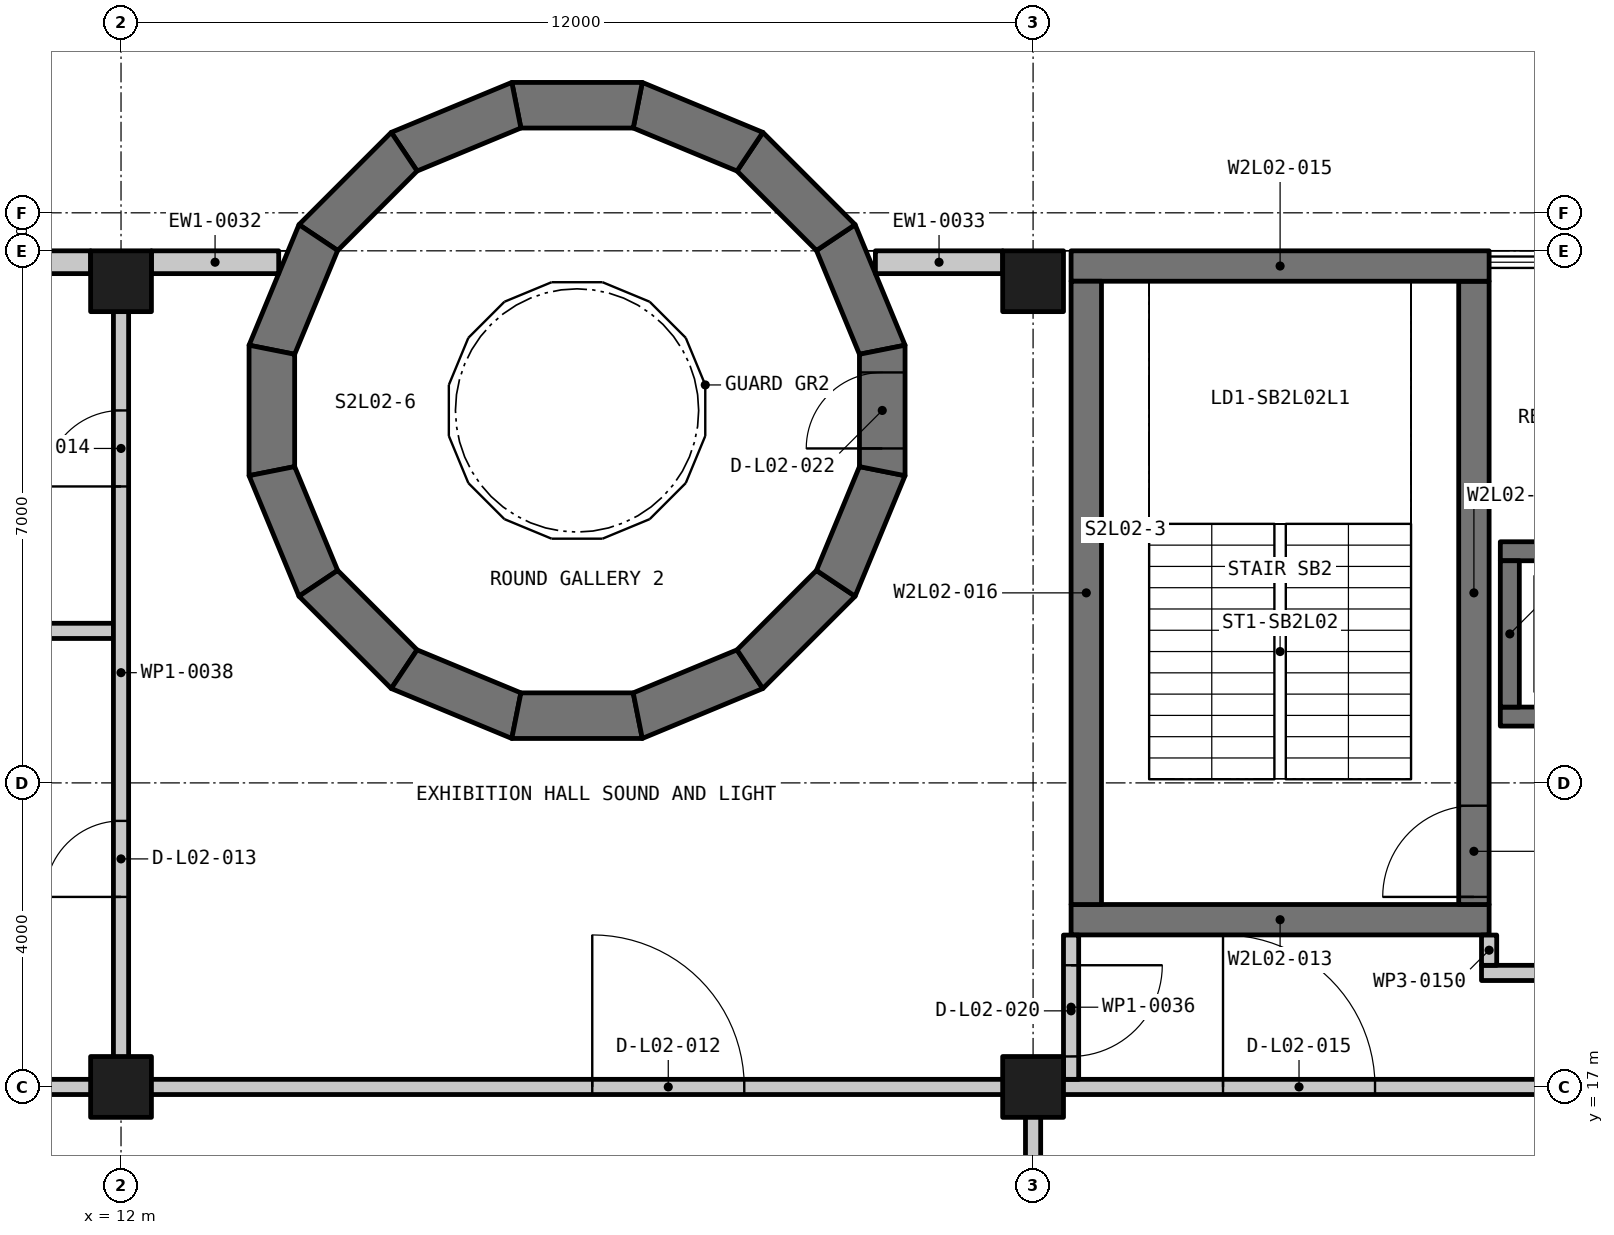
"""IFC4 building model, lengths in metres.
Left out: names, types, materials, properties, quantities, classifications, styles, units other than length and angle.
Written with IfcOpenShell. Run it as: python <this file> out.ifc"""

import sys

from ifc_helpers import new_model, si_unit, direction, frame, frame_2d, origin, origin_2d, place, context, subcontext, project, spatial, polyline, rectangle, outline, extrude, element, fill, save


model = new_model("IFC4")
c1 = context("Model", 3, precision=1e-05, world=origin(), true_north=direction((0.0, 1.0)))
c2 = subcontext(c1, "Body", "Model", "MODEL_VIEW")
j1 = project(units=[si_unit("LENGTHUNIT", "METRE"), si_unit("PLANEANGLEUNIT", "RADIAN")], contexts=[c1])
p1 = place(None, origin())
s1 = spatial("IfcSite", under=j1, at=p1, CompositionType="ELEMENT")
p2 = place(p1, origin())
s2 = spatial("IfcBuilding", under=s1, at=p2, CompositionType="ELEMENT")
p3 = place(p2, frame((0.0, 0.0, 11.25)))
s3 = spatial("IfcBuildingStorey", under=s2, at=p3, CompositionType="ELEMENT", Elevation=11.25)
p4 = place(p3, frame((12.0, 17.0, -0.3), z_axis=(0.0, 0.0, 1.0), x_axis=(1.0, 0.0, 0.0)))
e1 = element("IfcColumn", 1, at=p4, inside=s3, PredefinedType="COLUMN", context=c2, shape_type="SweptSolid", body=[
    extrude(rectangle(XDim=0.8, YDim=0.8, at=origin_2d()), origin(), (0.0, 0.0, 1.0), 4.05),
])
p5 = place(p3, frame((12.0, 27.6, -0.3), z_axis=(0.0, 0.0, 1.0), x_axis=(1.0, 0.0, 0.0)))
e2 = element("IfcColumn", 2, at=p5, inside=s3, PredefinedType="COLUMN", context=c2, shape_type="SweptSolid", body=[
    extrude(rectangle(XDim=0.8, YDim=0.8, at=origin_2d()), origin(), (0.0, 0.0, 1.0), 4.16),
])
p6 = place(p3, frame((24.0, 17.0, -0.3), z_axis=(0.0, 0.0, 1.0), x_axis=(1.0, 0.0, 0.0)))
e3 = element("IfcColumn", 3, at=p6, inside=s3, PredefinedType="COLUMN", context=c2, shape_type="SweptSolid", body=[
    extrude(rectangle(XDim=0.8, YDim=0.8, at=origin_2d()), origin(), (0.0, 0.0, 1.0), 4.05),
])
p7 = place(p3, frame((24.0, 27.6, -0.3), z_axis=(0.0, 0.0, 1.0), x_axis=(1.0, 0.0, 0.0)))
e4 = element("IfcColumn", 4, at=p7, inside=s3, PredefinedType="COLUMN", context=c2, shape_type="SweptSolid", body=[
    extrude(rectangle(XDim=0.8, YDim=0.8, at=origin_2d()), origin(), (0.0, 0.0, 1.0), 4.16),
])
p8 = place(p3, frame((22.038, 26.644, -0.3), z_axis=(0.0, 0.0, 1.0), x_axis=(-0.382665770144, 0.923886848245, 0.0)))
e5 = element("IfcWall", 5, at=p8, inside=s3, PredefinedType="SHEAR", context=c2, shape_type="SweptSolid", body=[
    extrude(outline(polyline([(0.0, -0.3), (1.717, -0.3), (1.597, 0.3), (0.119, 0.3), (0.0, -0.3)])), origin(), (0.0, 0.0, 1.0), 4.5),
])
p9 = place(p3, frame((21.446, 28.132, -0.3), z_axis=(0.0, 0.0, 1.0), x_axis=(-0.707035675874, 0.707177879349, 0.0)))
e6 = element("IfcWall", 6, at=p9, inside=s3, PredefinedType="SHEAR", context=c2, shape_type="SweptSolid", body=[
    extrude(outline(polyline([(0.0, -0.3), (1.717, -0.3), (1.597, 0.3), (0.119, 0.3), (0.0, -0.3)])), origin(), (0.0, 0.0, 1.0), 4.5),
])
p10 = place(p3, frame((20.33, 29.281, -0.3), z_axis=(0.0, 0.0, 1.0), x_axis=(-0.923866021052, 0.382716050285, 0.0)))
e7 = element("IfcWall", 7, at=p10, inside=s3, PredefinedType="SHEAR", context=c2, shape_type="SweptSolid", body=[
    extrude(outline(polyline([(0.0, -0.3), (1.717, -0.3), (1.597, 0.3), (0.119, 0.3), (0.0, -0.3)])), origin(), (0.0, 0.0, 1.0), 4.5),
])
p11 = place(p3, frame((18.858, 29.916, -0.3), z_axis=(0.0, 0.0, 1.0), x_axis=(-1.0, 0.0, 0.0)))
e8 = element("IfcWall", 8, at=p11, inside=s3, PredefinedType="SHEAR", context=c2, shape_type="SweptSolid", body=[
    extrude(outline(polyline([(0.0, -0.3), (1.717, -0.3), (1.597, 0.3), (0.119, 0.3), (0.0, -0.3)])), origin(), (0.0, 0.0, 1.0), 4.5),
])
p12 = place(p3, frame((17.256, 29.938, -0.3), z_axis=(0.0, 0.0, 1.0), x_axis=(-0.923866021052, -0.382716050285, 0.0)))
e9 = element("IfcWall", 9, at=p12, inside=s3, PredefinedType="SHEAR", context=c2, shape_type="SweptSolid", body=[
    extrude(outline(polyline([(-0.0, -0.3), (1.717, -0.3), (1.597, 0.3), (0.119, 0.3), (-0.0, -0.3)])), origin(), (0.0, 0.0, 1.0), 4.5),
])
p13 = place(p3, frame((15.768, 29.346, -0.3), z_axis=(0.0, 0.0, 1.0), x_axis=(-0.707035675874, -0.707177879349, 0.0)))
e10 = element("IfcWall", 10, at=p13, inside=s3, PredefinedType="SHEAR", context=c2, shape_type="SweptSolid", body=[
    extrude(outline(polyline([(0.0, -0.3), (1.717, -0.3), (1.598, 0.3), (0.119, 0.3), (0.0, -0.3)])), origin(), (0.0, 0.0, 1.0), 4.5),
])
p14 = place(p3, frame((14.619, 28.23, -0.3), z_axis=(0.0, 0.0, 1.0), x_axis=(-0.382665770144, -0.923886848245, 0.0)))
e11 = element("IfcWall", 11, at=p14, inside=s3, PredefinedType="SHEAR", context=c2, shape_type="SweptSolid", body=[
    extrude(outline(polyline([(0.0, -0.3), (1.717, -0.3), (1.598, 0.3), (0.119, 0.3), (0.0, -0.3)])), origin(), (0.0, 0.0, 1.0), 4.5),
])
p15 = place(p3, frame((13.985, 26.758, -0.3), z_axis=(0.0, 0.0, 1.0), x_axis=(0.0, -1.0, 0.0)))
e12 = element("IfcWall", 12, at=p15, inside=s3, PredefinedType="SHEAR", context=c2, shape_type="SweptSolid", body=[
    extrude(outline(polyline([(0.0, -0.3), (1.717, -0.3), (1.597, 0.3), (0.119, 0.3), (0.0, -0.3)])), origin(), (0.0, 0.0, 1.0), 4.5),
])
p16 = place(p3, frame((13.962, 25.156, -0.3), z_axis=(0.0, 0.0, 1.0), x_axis=(0.382665770144, -0.923886848245, 0.0)))
e13 = element("IfcWall", 13, at=p16, inside=s3, PredefinedType="SHEAR", context=c2, shape_type="SweptSolid", body=[
    extrude(outline(polyline([(0.0, -0.3), (1.717, -0.3), (1.597, 0.3), (0.119, 0.3), (0.0, -0.3)])), origin(), (0.0, 0.0, 1.0), 4.5),
])
p17 = place(p3, frame((14.554, 23.668, -0.3), z_axis=(0.0, 0.0, 1.0), x_axis=(0.707035675874, -0.707177879349, 0.0)))
e14 = element("IfcWall", 14, at=p17, inside=s3, PredefinedType="SHEAR", context=c2, shape_type="SweptSolid", body=[
    extrude(outline(polyline([(0.0, -0.3), (1.717, -0.3), (1.597, 0.3), (0.119, 0.3), (0.0, -0.3)])), origin(), (0.0, 0.0, 1.0), 4.5),
])
p18 = place(p3, frame((15.67, 22.519, -0.3), z_axis=(0.0, 0.0, 1.0), x_axis=(0.923866021052, -0.382716050285, 0.0)))
e15 = element("IfcWall", 15, at=p18, inside=s3, PredefinedType="SHEAR", context=c2, shape_type="SweptSolid", body=[
    extrude(outline(polyline([(0.0, -0.3), (1.717, -0.3), (1.597, 0.3), (0.119, 0.3), (0.0, -0.3)])), origin(), (0.0, 0.0, 1.0), 4.5),
])
p19 = place(p3, frame((17.142, 21.885, -0.3), z_axis=(0.0, 0.0, 1.0), x_axis=(1.0, 0.0, 0.0)))
e16 = element("IfcWall", 16, at=p19, inside=s3, PredefinedType="SHEAR", context=c2, shape_type="SweptSolid", body=[
    extrude(outline(polyline([(0.0, -0.3), (1.717, -0.3), (1.597, 0.3), (0.119, 0.3), (0.0, -0.3)])), origin(), (0.0, 0.0, 1.0), 4.5),
])
p20 = place(p3, frame((18.744, 21.862, -0.3), z_axis=(0.0, 0.0, 1.0), x_axis=(0.923866021052, 0.382716050285, 0.0)))
e17 = element("IfcWall", 17, at=p20, inside=s3, PredefinedType="SHEAR", context=c2, shape_type="SweptSolid", body=[
    extrude(outline(polyline([(-0.0, -0.3), (1.717, -0.3), (1.597, 0.3), (0.119, 0.3), (-0.0, -0.3)])), origin(), (0.0, 0.0, 1.0), 4.5),
])
p21 = place(p3, frame((20.232, 22.454, -0.3), z_axis=(0.0, 0.0, 1.0), x_axis=(0.707035675874, 0.707177879349, 0.0)))
e18 = element("IfcWall", 18, at=p21, inside=s3, PredefinedType="SHEAR", context=c2, shape_type="SweptSolid", body=[
    extrude(outline(polyline([(0.0, -0.3), (1.717, -0.3), (1.598, 0.3), (0.119, 0.3), (0.0, -0.3)])), origin(), (0.0, 0.0, 1.0), 4.5),
])
p22 = place(p3, frame((21.381, 23.57, -0.3), z_axis=(0.0, 0.0, 1.0), x_axis=(0.382665770144, 0.923886848245, 0.0)))
e19 = element("IfcWall", 19, at=p22, inside=s3, PredefinedType="SHEAR", context=c2, shape_type="SweptSolid", body=[
    extrude(outline(polyline([(0.0, -0.3), (1.717, -0.3), (1.597, 0.3), (0.119, 0.3), (0.0, -0.3)])), origin(), (0.0, 0.0, 1.0), 4.5),
])
p23 = place(p3, frame((22.015, 25.042, -0.3), z_axis=(0.0, 0.0, 1.0), x_axis=(0.0, 1.0, 0.0)))
e20 = element("IfcWall", 20, at=p23, inside=s3, PredefinedType="SHEAR", context=c2, shape_type="SweptSolid", body=[
    extrude(outline(polyline([(0.0, -0.3), (1.717, -0.3), (1.597, 0.3), (0.119, 0.3), (0.0, -0.3)])), origin(), (0.0, 0.0, 1.0), 4.5),
])
p24 = place(p23, frame((0.358, 0.0, 0.3)))
e21 = element("IfcOpeningElement", 21, at=p24, cuts=e20, PredefinedType="OPENING", context=c2, shape_type="SweptSolid", body=[
    extrude(rectangle(XDim=1.0, YDim=2.2, at=frame_2d((0.5, 1.1))), frame((0.0, 0.31, 0.0), z_axis=(0.0, -1.0, 0.0), x_axis=(1.0, 0.0, 0.0)), (0.0, 0.0, 1.0), 0.62),
])
p25 = place(p3, frame((30.147, 21.873, -0.3), z_axis=(0.0, 0.0, 1.0), x_axis=(1.0, 0.0, 0.0)))
e22 = element("IfcWall", 22, at=p25, inside=s3, PredefinedType="SHEAR", context=c2, shape_type="SweptSolid", body=[
    extrude(rectangle(XDim=2.425, YDim=0.25, at=frame_2d((1.212, 0.0))), origin(), (0.0, 0.0, 1.0), 4.5),
])
p26 = place(p25, frame((0.663, 0.0, 0.3)))
e23 = element("IfcOpeningElement", 23, at=p26, cuts=e22, PredefinedType="OPENING", context=c2, shape_type="SweptSolid", body=[
    extrude(rectangle(XDim=1.1, YDim=2.1, at=frame_2d((0.55, 1.05))), frame((0.0, 0.135, 0.0), z_axis=(0.0, -1.0, 0.0), x_axis=(1.0, 0.0, 0.0)), (0.0, 0.0, 1.0), 0.27),
])
p27 = place(p3, frame((30.147, 24.048, -0.3), z_axis=(0.0, 0.0, 1.0), x_axis=(1.0, 0.0, 0.0)))
e24 = element("IfcWall", 24, at=p27, inside=s3, PredefinedType="SHEAR", context=c2, shape_type="SweptSolid", body=[
    extrude(rectangle(XDim=2.425, YDim=0.25, at=frame_2d((1.212, 0.0))), origin(), (0.0, 0.0, 1.0), 4.5),
])
p28 = place(p3, frame((30.272, 21.998, -0.3), z_axis=(0.0, 0.0, 1.0), x_axis=(0.0, 1.0, 0.0)))
e25 = element("IfcWall", 25, at=p28, inside=s3, PredefinedType="SHEAR", context=c2, shape_type="SweptSolid", body=[
    extrude(rectangle(XDim=1.925, YDim=0.25, at=frame_2d((0.962, 0.0))), origin(), (0.0, 0.0, 1.0), 4.5),
])
p29 = place(p3, frame((24.5, 19.2, -0.3), z_axis=(0.0, 0.0, 1.0), x_axis=(1.0, 0.0, 0.0)))
e26 = element("IfcWall", 26, at=p29, inside=s3, PredefinedType="SHEAR", context=c2, shape_type="SweptSolid", body=[
    extrude(rectangle(XDim=5.5, YDim=0.4, at=frame_2d((2.75, 0.0))), origin(), (0.0, 0.0, 1.0), 4.5),
])
p30 = place(p3, frame((29.8, 19.4, -0.3), z_axis=(0.0, 0.0, 1.0), x_axis=(0.0, 1.0, 0.0)))
e27 = element("IfcWall", 27, at=p30, inside=s3, PredefinedType="SHEAR", context=c2, shape_type="SweptSolid", body=[
    extrude(rectangle(XDim=8.2, YDim=0.4, at=frame_2d((4.1, 0.0))), origin(), (0.0, 0.0, 1.0), 4.5),
])
p31 = place(p30, frame((0.1, 0.0, 0.3)))
e28 = element("IfcOpeningElement", 28, at=p31, cuts=e27, PredefinedType="OPENING", context=c2, shape_type="SweptSolid", body=[
    extrude(rectangle(XDim=1.2, YDim=2.2, at=frame_2d((0.6, 1.1))), frame((0.0, 0.21, 0.0), z_axis=(0.0, -1.0, 0.0), x_axis=(1.0, 0.0, 0.0)), (0.0, 0.0, 1.0), 0.42),
])
p32 = place(p3, frame((24.5, 27.8, -0.3), z_axis=(0.0, 0.0, 1.0), x_axis=(1.0, 0.0, 0.0)))
e29 = element("IfcWall", 29, at=p32, inside=s3, PredefinedType="SHEAR", context=c2, shape_type="SweptSolid", body=[
    extrude(rectangle(XDim=5.5, YDim=0.4, at=frame_2d((2.75, 0.0))), origin(), (0.0, 0.0, 1.0), 4.5),
])
p33 = place(p3, frame((24.7, 19.4, -0.3), z_axis=(0.0, 0.0, 1.0), x_axis=(0.0, 1.0, 0.0)))
e30 = element("IfcWall", 30, at=p33, inside=s3, PredefinedType="SHEAR", context=c2, shape_type="SweptSolid", body=[
    extrude(rectangle(XDim=8.2, YDim=0.4, at=frame_2d((4.1, 0.0))), origin(), (0.0, 0.0, 1.0), 4.5),
])
p34 = place(p3, frame((6.0, 27.85, 0.0), z_axis=(0.0, 0.0, 1.0), x_axis=(1.0, 0.0, 0.0)))
e31 = element("IfcWall", 31, at=p34, inside=s3, PredefinedType="SOLIDWALL", context=c2, shape_type="SweptSolid", body=[
    extrude(rectangle(XDim=5.6, YDim=0.3, at=frame_2d((2.8, 0.0))), origin(), (0.0, 0.0, 1.0), 3.86),
])
for number, where, z_axis, x_axis in (
    (32, (12.4, 27.85, 0.0), (0.0, 0.0, 1.0), (1.0, 0.0, 0.0)),
    (33, (21.926, 27.85, 0.0), (0.0, 0.0, 1.0), (1.0, 0.0, 0.0)),
):
    element("IfcWall", number, at=place(p3, frame(where, z_axis=z_axis, x_axis=x_axis)), inside=s3, PredefinedType="SOLIDWALL", context=c2, shape_type="SweptSolid", body=[
        extrude(rectangle(XDim=1.675, YDim=0.3, at=frame_2d((0.837, 0.0))), origin(), (0.0, 0.0, 1.0), 3.86),
    ])
p35 = place(p3, frame((5.9, 17.0, 0.0), z_axis=(0.0, 0.0, 1.0), x_axis=(1.0, 0.0, 0.0)))
e34 = element("IfcWall", 34, at=p35, inside=s3, PredefinedType="PARTITIONING", context=c2, shape_type="SweptSolid", body=[
    extrude(rectangle(XDim=54.2, YDim=0.2, at=frame_2d((27.1, 0.0))), origin(), (0.0, 0.0, 1.0), 3.75),
])
p36 = place(p35, frame((12.3, 0.0, 0.0)))
e35 = element("IfcOpeningElement", 35, at=p36, cuts=e34, PredefinedType="OPENING", context=c2, shape_type="SweptSolid", body=[
    extrude(rectangle(XDim=2.0, YDim=2.1, at=frame_2d((1.0, 1.05))), frame((0.0, 0.11, 0.0), z_axis=(0.0, -1.0, 0.0), x_axis=(1.0, 0.0, 0.0)), (0.0, 0.0, 1.0), 0.22),
])
p37 = place(p35, frame((20.599, 0.0, 0.0)))
e36 = element("IfcOpeningElement", 36, at=p37, cuts=e34, PredefinedType="OPENING", context=c2, shape_type="SweptSolid", body=[
    extrude(rectangle(XDim=2.0, YDim=2.1, at=frame_2d((1.0, 1.05))), frame((0.0, 0.11, 0.0), z_axis=(0.0, -1.0, 0.0), x_axis=(1.0, 0.0, 0.0)), (0.0, 0.0, 1.0), 0.22),
])
p38 = place(p35, frame((47.35, 0.0, 0.0)))
e37 = element("IfcOpeningElement", 37, at=p38, cuts=e34, PredefinedType="OPENING", context=c2, shape_type="SweptSolid", body=[
    extrude(rectangle(XDim=1.5, YDim=2.1, at=frame_2d((0.75, 1.05))), frame((0.0, 0.11, 0.0), z_axis=(0.0, -1.0, 0.0), x_axis=(1.0, 0.0, 0.0)), (0.0, 0.0, 1.0), 0.22),
])
p39 = place(p3, frame((29.9, 18.5, 0.0), z_axis=(0.0, 0.0, 1.0), x_axis=(1.0, 0.0, 0.0)))
e38 = element("IfcWall", 38, at=p39, inside=s3, PredefinedType="PARTITIONING", context=c2, shape_type="SweptSolid", body=[
    extrude(rectangle(XDim=5.7, YDim=0.2, at=frame_2d((2.85, 0.0))), origin(), (0.0, 0.0, 1.0), 4.35),
])
p40 = place(p3, frame((6.002, 23.0, 0.0), z_axis=(0.0, 0.0, 1.0), x_axis=(1.0, 0.0, 0.0)))
e39 = element("IfcWall", 39, at=p40, inside=s3, PredefinedType="PARTITIONING", context=c2, shape_type="SweptSolid", body=[
    extrude(rectangle(XDim=5.898, YDim=0.2, at=frame_2d((2.949, 0.0))), origin(), (0.0, 0.0, 1.0), 4.35),
])
p41 = place(p3, frame((30.0, 18.6, 0.0), z_axis=(0.0, 0.0, 1.0), x_axis=(0.0, 1.0, 0.0)))
e40 = element("IfcWall", 40, at=p41, inside=s3, PredefinedType="PARTITIONING", context=c2, shape_type="SweptSolid", body=[
    extrude(rectangle(XDim=0.398, YDim=0.2, at=frame_2d((0.199, 0.0))), origin(), (0.0, 0.0, 1.0), 4.35),
])
p42 = place(p3, frame((24.5, 18.998, 0.0), z_axis=(0.0, 0.0, 1.0), x_axis=(0.0, -1.0, 0.0)))
e41 = element("IfcWall", 41, at=p42, inside=s3, PredefinedType="PARTITIONING", context=c2, shape_type="SweptSolid", body=[
    extrude(rectangle(XDim=1.898, YDim=0.2, at=frame_2d((0.949, 0.0))), origin(), (0.0, 0.0, 1.0), 4.35),
])
p43 = place(p42, frame((0.397, 0.0, 0.0)))
e42 = element("IfcOpeningElement", 42, at=p43, cuts=e41, PredefinedType="OPENING", context=c2, shape_type="SweptSolid", body=[
    extrude(rectangle(XDim=1.2, YDim=2.1, at=frame_2d((0.6, 1.05))), frame((0.0, 0.11, 0.0), z_axis=(0.0, -1.0, 0.0), x_axis=(1.0, 0.0, 0.0)), (0.0, 0.0, 1.0), 0.22),
])
p44 = place(p3, frame((24.0, 6.2, 0.0), z_axis=(0.0, 0.0, 1.0), x_axis=(0.0, 1.0, 0.0)))
e43 = element("IfcWall", 43, at=p44, inside=s3, PredefinedType="PARTITIONING", context=c2, shape_type="SweptSolid", body=[
    extrude(rectangle(XDim=10.7, YDim=0.2, at=frame_2d((5.35, 0.0))), origin(), (0.0, 0.0, 1.0), 3.86),
])
p45 = place(p3, frame((12.0, 17.1, 0.0), z_axis=(0.0, 0.0, 1.0), x_axis=(0.0, 1.0, 0.0)))
e44 = element("IfcWall", 44, at=p45, inside=s3, PredefinedType="PARTITIONING", context=c2, shape_type="SweptSolid", body=[
    extrude(rectangle(XDim=10.7, YDim=0.2, at=frame_2d((5.35, 0.0))), origin(), (0.0, 0.0, 1.0), 3.86),
])
p46 = place(p45, frame((2.4, 0.0, 0.0)))
e45 = element("IfcOpeningElement", 45, at=p46, cuts=e44, PredefinedType="OPENING", context=c2, shape_type="SweptSolid", body=[
    extrude(rectangle(XDim=1.0, YDim=2.1, at=frame_2d((0.5, 1.05))), frame((0.0, 0.11, 0.0), z_axis=(0.0, -1.0, 0.0), x_axis=(1.0, 0.0, 0.0)), (0.0, 0.0, 1.0), 0.22),
])
p47 = place(p45, frame((7.8, 0.0, 0.0)))
e46 = element("IfcOpeningElement", 46, at=p47, cuts=e44, PredefinedType="OPENING", context=c2, shape_type="SweptSolid", body=[
    extrude(rectangle(XDim=1.0, YDim=2.1, at=frame_2d((0.5, 1.05))), frame((0.0, 0.11, 0.0), z_axis=(0.0, -1.0, 0.0), x_axis=(1.0, 0.0, 0.0)), (0.0, 0.0, 1.0), 0.22),
])
p48 = place(p31, origin())
e47 = element("IfcDoor", 47, at=p48, inside=s3, OperationType="SINGLE_SWING_RIGHT", PredefinedType="DOOR", context=c2, shape_type="SweptSolid", body=[
    extrude(rectangle(XDim=1.2, YDim=2.2, at=frame_2d((0.6, 1.1))), frame((0.0, 0.025, 0.0), z_axis=(0.0, -1.0, 0.0), x_axis=(1.0, 0.0, 0.0)), (0.0, 0.0, 1.0), 0.05),
])
fill(e28, e47)
p49 = place(p36, origin())
e48 = element("IfcDoor", 48, at=p49, inside=s3, OperationType="DOUBLE_DOOR_SINGLE_SWING", PredefinedType="DOOR", context=c2, shape_type="SweptSolid", body=[
    extrude(rectangle(XDim=2.0, YDim=2.1, at=frame_2d((1.0, 1.05))), frame((0.0, 0.025, 0.0), z_axis=(0.0, -1.0, 0.0), x_axis=(1.0, 0.0, 0.0)), (0.0, 0.0, 1.0), 0.05),
])
fill(e35, e48)
p50 = place(p46, origin())
e49 = element("IfcDoor", 49, at=p50, inside=s3, OperationType="SINGLE_SWING_RIGHT", PredefinedType="DOOR", context=c2, shape_type="SweptSolid", body=[
    extrude(rectangle(XDim=1.0, YDim=2.1, at=frame_2d((0.5, 1.05))), frame((0.0, 0.025, 0.0), z_axis=(0.0, -1.0, 0.0), x_axis=(1.0, 0.0, 0.0)), (0.0, 0.0, 1.0), 0.05),
])
fill(e45, e49)
p51 = place(p47, origin())
e50 = element("IfcDoor", 50, at=p51, inside=s3, OperationType="SINGLE_SWING_LEFT", PredefinedType="DOOR", context=c2, shape_type="SweptSolid", body=[
    extrude(rectangle(XDim=1.0, YDim=2.1, at=frame_2d((0.5, 1.05))), frame((0.0, 0.025, 0.0), z_axis=(0.0, -1.0, 0.0), x_axis=(1.0, 0.0, 0.0)), (0.0, 0.0, 1.0), 0.05),
])
fill(e46, e50)
p52 = place(p37, origin())
e51 = element("IfcDoor", 51, at=p52, inside=s3, OperationType="DOUBLE_DOOR_SINGLE_SWING", PredefinedType="DOOR", context=c2, shape_type="SweptSolid", body=[
    extrude(rectangle(XDim=2.0, YDim=2.1, at=frame_2d((1.0, 1.05))), frame((0.0, 0.025, 0.0), z_axis=(0.0, -1.0, 0.0), x_axis=(1.0, 0.0, 0.0)), (0.0, 0.0, 1.0), 0.05),
])
fill(e36, e51)
p53 = place(p43, origin())
e52 = element("IfcDoor", 52, at=p53, inside=s3, OperationType="SINGLE_SWING_LEFT", PredefinedType="DOOR", context=c2, shape_type="SweptSolid", body=[
    extrude(rectangle(XDim=1.2, YDim=2.1, at=frame_2d((0.6, 1.05))), frame((0.0, 0.025, 0.0), z_axis=(0.0, -1.0, 0.0), x_axis=(1.0, 0.0, 0.0)), (0.0, 0.0, 1.0), 0.05),
])
fill(e42, e52)
p54 = place(p24, origin())
e53 = element("IfcDoor", 53, at=p54, inside=s3, OperationType="SINGLE_SWING_RIGHT", PredefinedType="DOOR", context=c2, shape_type="SweptSolid", body=[
    extrude(rectangle(XDim=1.0, YDim=2.2, at=frame_2d((0.5, 1.1))), frame((0.0, 0.025, 0.0), z_axis=(0.0, -1.0, 0.0), x_axis=(1.0, 0.0, 0.0)), (0.0, 0.0, 1.0), 0.05),
])
fill(e21, e53)
save(model, sys.argv[1])
